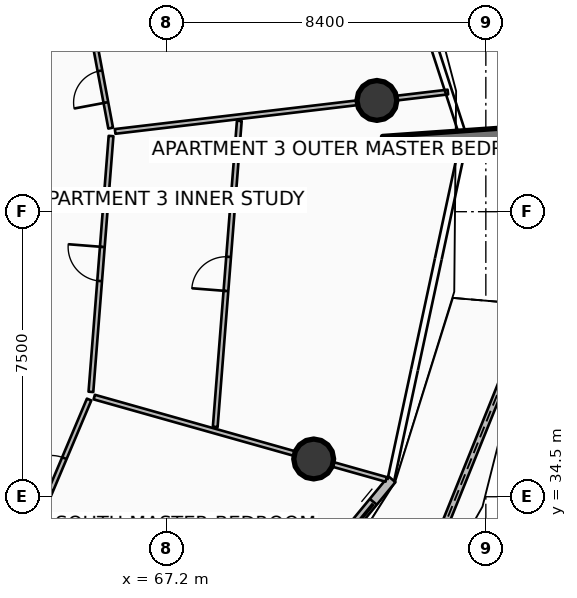
"""IFC4 building model, lengths in metres.
Left out: names, types, materials, properties, quantities, classifications, styles, units other than length and angle.
Written with IfcOpenShell. Run it as: python <this file> out.ifc"""

import sys

from ifc_helpers import new_model, si_unit, direction, frame, frame_2d, origin, origin_2d, place, context, subcontext, project, spatial, polyline, rectangle, circle, outline, extrude, element, fill, save


model = new_model("IFC4")
c1 = context("Model", 3, precision=1e-05, world=origin(), true_north=direction((0.0, 1.0)))
c2 = subcontext(c1, "Body", "Model", "MODEL_VIEW")
j1 = project(units=[si_unit("LENGTHUNIT", "METRE"), si_unit("PLANEANGLEUNIT", "RADIAN")], contexts=[c1])
p1 = place(None, origin())
s1 = spatial("IfcSite", under=j1, at=p1, CompositionType="ELEMENT")
p2 = place(p1, origin())
s2 = spatial("IfcBuilding", under=s1, at=p2, CompositionType="ELEMENT")
p3 = place(p2, frame((0.0, 0.0, 157.8)))
s3 = spatial("IfcBuildingStorey", under=s2, at=p3, CompositionType="ELEMENT", Elevation=157.8)
p4 = place(p3, frame((72.897, 43.741, 0.0), z_axis=(0.0, 0.0, 1.0), x_axis=(0.997564163539, 0.069754853754, 0.0)))
e1 = element("IfcWall", 1, at=p4, inside=s3, PredefinedType="SOLIDWALL", context=c2, shape_type="SweptSolid", body=[
    extrude(rectangle(XDim=3.5, YDim=0.48, at=frame_2d((1.75, 0.0))), origin(), (0.0, 0.0, 1.0), 3.75),
])
for number, where, z_axis, x_axis in (
    (2, (71.07, 35.494, 0.0), (0.0, 0.0, 1.0), (1.0, 0.0, 0.0)),
    (3, (72.733, 44.927, 0.0), (0.0, 0.0, 1.0), (1.0, 0.0, 0.0)),
):
    element("IfcColumn", number, at=place(p3, frame(where, z_axis=z_axis, x_axis=x_axis)), inside=s3, PredefinedType="COLUMN", context=c2, shape_type="SweptSolid", body=[
        extrude(circle(Radius=0.525, at=origin_2d()), origin(), (0.0, 0.0, 1.0), 3.5),
    ])
p5 = place(p3, frame((72.8, 29.498, 0.0), z_axis=(0.0, 0.0, 1.0), x_axis=(0.373952087888, 0.927448023322, 0.0)))
e4 = element("IfcWall", 4, at=p5, inside=s3, PredefinedType="PARAPET", context=c2, shape_type="SweptSolid", body=[
    extrude(outline(polyline([(0.0, 0.0), (10.84, 0.0), (10.84, 1.497), (5.42, 1.696), (0.0, 1.832), (0.0, 0.0)])), frame((0.0, 0.09, 0.0), z_axis=(0.0, -1.0, 0.0), x_axis=(1.0, 0.0, 0.0)), (0.0, 0.0, 1.0), 0.18),
])
p6 = place(p3, frame((66.709, 27.187, 0.0), z_axis=(0.0, 0.0, 1.0), x_axis=(0.636771922292, 0.77105221547, 0.0)))
e5 = element("IfcWall", 5, at=p6, inside=s3, PredefinedType="SOLIDWALL", context=c2, shape_type="SweptSolid", body=[
    extrude(rectangle(XDim=10.082, YDim=0.24, at=frame_2d((5.041, 0.0))), origin(), (0.0, 0.0, 1.0), 2.45),
])
p7 = place(p6, frame((7.862, 0.0, 0.0)))
e6 = element("IfcOpeningElement", 6, at=p7, cuts=e5, PredefinedType="OPENING", context=c2, shape_type="SweptSolid", body=[
    extrude(rectangle(XDim=1.45, YDim=2.15, at=frame_2d((0.725, 1.075))), frame((0.0, 0.13, 0.0), z_axis=(0.0, -1.0, 0.0), x_axis=(1.0, 0.0, 0.0)), (0.0, 0.0, 1.0), 0.26),
])
p8 = place(p6, frame((0.28, 0.0, 0.65)))
e7 = element("IfcOpeningElement", 7, at=p8, cuts=e5, PredefinedType="OPENING", context=c2, shape_type="SweptSolid", body=[
    extrude(rectangle(XDim=1.6, YDim=1.5, at=frame_2d((0.8, 0.75))), frame((0.0, 0.13, 0.0), z_axis=(0.0, -1.0, 0.0), x_axis=(1.0, 0.0, 0.0)), (0.0, 0.0, 1.0), 0.26),
])
p9 = place(p3, frame((63.509, 33.144, 0.0), z_axis=(0.0, 0.0, 1.0), x_axis=(0.38881485578, 0.921315911034, 0.0)))
e8 = element("IfcWall", 8, at=p9, inside=s3, PredefinedType="PARTITIONING", context=c2, shape_type="SweptSolid", body=[
    extrude(rectangle(XDim=4.248, YDim=0.125, at=frame_2d((2.124, 0.0))), origin(), (0.0, 0.0, 1.0), 2.94),
])
p10 = place(p9, frame((1.674, 0.0, 0.0)))
e9 = element("IfcOpeningElement", 9, at=p10, cuts=e8, PredefinedType="OPENING", context=c2, shape_type="SweptSolid", body=[
    extrude(rectangle(XDim=0.9, YDim=2.08, at=frame_2d((0.45, 1.04))), frame((0.0, 0.073, 0.0), z_axis=(0.0, -1.0, 0.0), x_axis=(1.0, 0.0, 0.0)), (0.0, 0.0, 1.0), 0.145),
])
p11 = place(p3, frame((65.295, 37.122, 0.0), z_axis=(0.0, 0.0, 1.0), x_axis=(0.962453364466, -0.271447087346, 0.0)))
e10 = element("IfcWall", 10, at=p11, inside=s3, PredefinedType="PARTITIONING", context=c2, shape_type="SweptSolid", body=[
    extrude(rectangle(XDim=7.981, YDim=0.125, at=frame_2d((3.991, 0.0))), origin(), (0.0, 0.0, 1.0), 2.94),
])
p12 = place(p3, frame((65.208, 37.259, 0.0), z_axis=(0.0, 0.0, 1.0), x_axis=(0.078457580711, 0.996917452966, 0.0)))
e11 = element("IfcWall", 11, at=p12, inside=s3, PredefinedType="PARTITIONING", context=c2, shape_type="SweptSolid", body=[
    extrude(rectangle(XDim=6.752, YDim=0.125, at=frame_2d((3.376, 0.0))), origin(), (0.0, 0.0, 1.0), 2.94),
])
p13 = place(p12, frame((2.926, 0.0, 0.0)))
e12 = element("IfcOpeningElement", 12, at=p13, cuts=e11, PredefinedType="OPENING", context=c2, shape_type="SweptSolid", body=[
    extrude(rectangle(XDim=0.9, YDim=2.08, at=frame_2d((0.45, 1.04))), frame((0.0, 0.073, 0.0), z_axis=(0.0, -1.0, 0.0), x_axis=(1.0, 0.0, 0.0)), (0.0, 0.0, 1.0), 0.145),
])
p14 = place(p3, frame((68.479, 36.336, 0.0), z_axis=(0.0, 0.0, 1.0), x_axis=(0.078482765766, 0.996915470578, 0.0)))
e13 = element("IfcWall", 13, at=p14, inside=s3, PredefinedType="PARTITIONING", context=c2, shape_type="SweptSolid", body=[
    extrude(rectangle(XDim=8.079, YDim=0.125, at=frame_2d((4.039, 0.0))), origin(), (0.0, 0.0, 1.0), 2.94),
])
p15 = place(p14, frame((3.589, 0.0, 0.0)))
e14 = element("IfcOpeningElement", 14, at=p15, cuts=e13, PredefinedType="OPENING", context=c2, shape_type="SweptSolid", body=[
    extrude(rectangle(XDim=0.9, YDim=2.08, at=frame_2d((0.45, 1.04))), frame((0.0, 0.073, 0.0), z_axis=(0.0, -1.0, 0.0), x_axis=(1.0, 0.0, 0.0)), (0.0, 0.0, 1.0), 0.145),
])
p16 = place(p3, frame((65.845, 44.112, 0.0), z_axis=(0.0, 0.0, 1.0), x_axis=(0.993069843717, 0.117525680174, 0.0)))
e15 = element("IfcWall", 15, at=p16, inside=s3, PredefinedType="PARTITIONING", context=c2, shape_type="SweptSolid", body=[
    extrude(rectangle(XDim=8.816, YDim=0.125, at=frame_2d((4.408, 0.0))), origin(), (0.0, 0.0, 1.0), 2.94),
])
p17 = place(p3, frame((65.728, 44.199, 0.0), z_axis=(0.0, 0.0, 1.0), x_axis=(-0.183909749888, 0.982943133602, 0.0)))
e16 = element("IfcWall", 16, at=p17, inside=s3, PredefinedType="PARTITIONING", context=c2, shape_type="SweptSolid", body=[
    extrude(rectangle(XDim=2.218, YDim=0.125, at=frame_2d((1.109, 0.0))), origin(), (0.0, 0.0, 1.0), 2.94),
])
p18 = place(p17, frame((0.684, 0.0, 0.0)))
e17 = element("IfcOpeningElement", 17, at=p18, cuts=e16, PredefinedType="OPENING", context=c2, shape_type="SweptSolid", body=[
    extrude(rectangle(XDim=0.85, YDim=2.06, at=frame_2d((0.425, 1.03))), frame((0.0, 0.073, 0.0), z_axis=(0.0, -1.0, 0.0), x_axis=(1.0, 0.0, 0.0)), (0.0, 0.0, 1.0), 0.145),
])
p19 = place(p7, origin())
e18 = element("IfcDoor", 18, at=p19, inside=s3, OperationType="DOUBLE_DOOR_SLIDING", PredefinedType="DOOR", context=c2, shape_type="SweptSolid", body=[
    extrude(rectangle(XDim=1.45, YDim=2.15, at=frame_2d((0.725, 1.075))), frame((0.0, 0.025, 0.0), z_axis=(0.0, -1.0, 0.0), x_axis=(1.0, 0.0, 0.0)), (0.0, 0.0, 1.0), 0.05),
])
fill(e6, e18)
p20 = place(p10, origin())
e19 = element("IfcDoor", 19, at=p20, inside=s3, OperationType="SINGLE_SWING_LEFT", PredefinedType="DOOR", context=c2, shape_type="SweptSolid", body=[
    extrude(rectangle(XDim=0.9, YDim=2.08, at=frame_2d((0.45, 1.04))), frame((0.0, 0.025, 0.0), z_axis=(0.0, -1.0, 0.0), x_axis=(1.0, 0.0, 0.0)), (0.0, 0.0, 1.0), 0.05),
])
fill(e9, e19)
p21 = place(p13, origin())
e20 = element("IfcDoor", 20, at=p21, inside=s3, OperationType="SINGLE_SWING_RIGHT", PredefinedType="DOOR", context=c2, shape_type="SweptSolid", body=[
    extrude(rectangle(XDim=0.9, YDim=2.08, at=frame_2d((0.45, 1.04))), frame((0.0, 0.025, 0.0), z_axis=(0.0, -1.0, 0.0), x_axis=(1.0, 0.0, 0.0)), (0.0, 0.0, 1.0), 0.05),
])
fill(e12, e20)
p22 = place(p15, origin())
e21 = element("IfcDoor", 21, at=p22, inside=s3, OperationType="SINGLE_SWING_LEFT", PredefinedType="DOOR", context=c2, shape_type="SweptSolid", body=[
    extrude(rectangle(XDim=0.9, YDim=2.08, at=frame_2d((0.45, 1.04))), frame((0.0, 0.025, 0.0), z_axis=(0.0, -1.0, 0.0), x_axis=(1.0, 0.0, 0.0)), (0.0, 0.0, 1.0), 0.05),
])
fill(e14, e21)
p23 = place(p18, origin())
e22 = element("IfcDoor", 22, at=p23, inside=s3, OperationType="SINGLE_SWING_LEFT", PredefinedType="DOOR", context=c2, shape_type="SweptSolid", body=[
    extrude(rectangle(XDim=0.85, YDim=2.06, at=frame_2d((0.425, 1.03))), frame((0.0, 0.025, 0.0), z_axis=(0.0, -1.0, 0.0), x_axis=(1.0, 0.0, 0.0)), (0.0, 0.0, 1.0), 0.05),
])
fill(e17, e22)
save(model, sys.argv[1])
